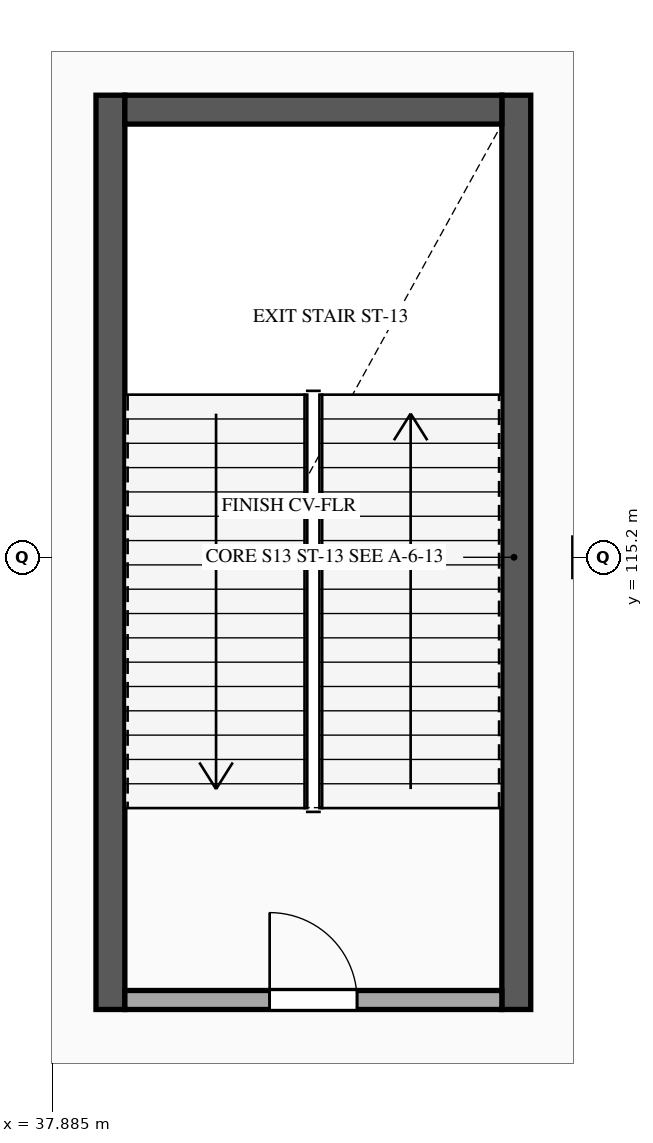
"""IFC4 building model, lengths in metres.
Left out: names, types, materials, properties, quantities, classifications, styles, units other than length and angle.
Written with IfcOpenShell. Run it as: python <this file> out.ifc"""

import sys

from ifc_helpers import new_model, si_unit, direction, frame, frame_2d, origin, origin_2d, place, context, subcontext, project, spatial, rectangle, hollow_circle, extrude, element, fill, save


model = new_model("IFC4")
c1 = context("Model", 3, precision=1e-05, world=origin(), true_north=direction((0.0, 1.0)))
c2 = subcontext(c1, "Body", "Model", "MODEL_VIEW")
j1 = project(units=[si_unit("LENGTHUNIT", "METRE"), si_unit("PLANEANGLEUNIT", "RADIAN")], contexts=[c1])
p1 = place(None, origin())
s1 = spatial("IfcSite", under=j1, at=p1, CompositionType="ELEMENT")
p2 = place(p1, origin())
s2 = spatial("IfcBuilding", under=s1, at=p2, CompositionType="ELEMENT")
p3 = place(p2, frame((0.0, 0.0, 5.4)))
s3 = spatial("IfcBuildingStorey", under=s2, at=p3, CompositionType="ELEMENT", Elevation=5.4)
p4 = place(p3, frame((45.0, 115.2, 0.0), z_axis=(0.0, 0.0, 1.0), x_axis=(1.0, 0.0, 0.0)))
e1 = element("IfcColumn", 1, at=p4, inside=s3, PredefinedType="COLUMN", context=c2, shape_type="SweptSolid", body=[
    extrude(hollow_circle(Radius=0.254, WallThickness=0.016, at=origin_2d()), origin(), (0.0, 0.0, 1.0), 5.4),
])
for number, where, z_axis, x_axis in (
    (2, (38.65, 109.25, 0.0), (0.0, 0.0, 1.0), (0.0, 1.0, 0.0)),
    (3, (43.99, 121.28, 0.0), (0.0, 0.0, 1.0), (0.0, -1.0, 0.0)),
):
    element("IfcWall", number, at=place(p3, frame(where, z_axis=z_axis, x_axis=x_axis)), inside=s3, PredefinedType="SHEAR", context=c2, shape_type="SweptSolid", body=[
        extrude(rectangle(XDim=12.03, YDim=0.38, at=frame_2d((6.015, 0.0))), origin(), (0.0, 0.0, 1.0), 5.12),
    ])
p5 = place(p3, frame((38.84, 121.09, 0.0), z_axis=(0.0, 0.0, 1.0), x_axis=(1.0, 0.0, 0.0)))
e4 = element("IfcWall", 4, at=p5, inside=s3, PredefinedType="SHEAR", context=c2, shape_type="SweptSolid", body=[
    extrude(rectangle(XDim=4.96, YDim=0.38, at=frame_2d((2.48, 0.0))), origin(), (0.0, 0.0, 1.0), 5.12),
])
p6 = place(p3, frame((38.84, 109.375, 0.0), z_axis=(0.0, 0.0, 1.0), x_axis=(1.0, 0.0, 0.0)))
e5 = element("IfcWall", 5, at=p6, inside=s3, PredefinedType="STANDARD", context=c2, shape_type="SweptSolid", body=[
    extrude(rectangle(XDim=4.96, YDim=0.25, at=frame_2d((2.48, 0.0))), origin(), (0.0, 0.0, 1.0), 5.12),
])
p7 = place(p6, frame((1.905, 0.0, 0.0)))
e6 = element("IfcOpeningElement", 6, at=p7, cuts=e5, PredefinedType="OPENING", context=c2, shape_type="SweptSolid", body=[
    extrude(rectangle(XDim=1.15, YDim=2.2, at=frame_2d((0.575, 1.1))), frame((0.0, 0.135, 0.0), z_axis=(0.0, -1.0, 0.0), x_axis=(1.0, 0.0, 0.0)), (0.0, 0.0, 1.0), 0.27),
])
p8 = place(p7, origin())
e7 = element("IfcDoor", 7, at=p8, inside=s3, OperationType="SINGLE_SWING_LEFT", PredefinedType="DOOR", context=c2, shape_type="SweptSolid", body=[
    extrude(rectangle(XDim=1.15, YDim=2.2, at=frame_2d((0.575, 1.1))), frame((0.0, 0.025, 0.0), z_axis=(0.0, -1.0, 0.0), x_axis=(1.0, 0.0, 0.0)), (0.0, 0.0, 1.0), 0.05),
])
fill(e6, e7)
save(model, sys.argv[1])
